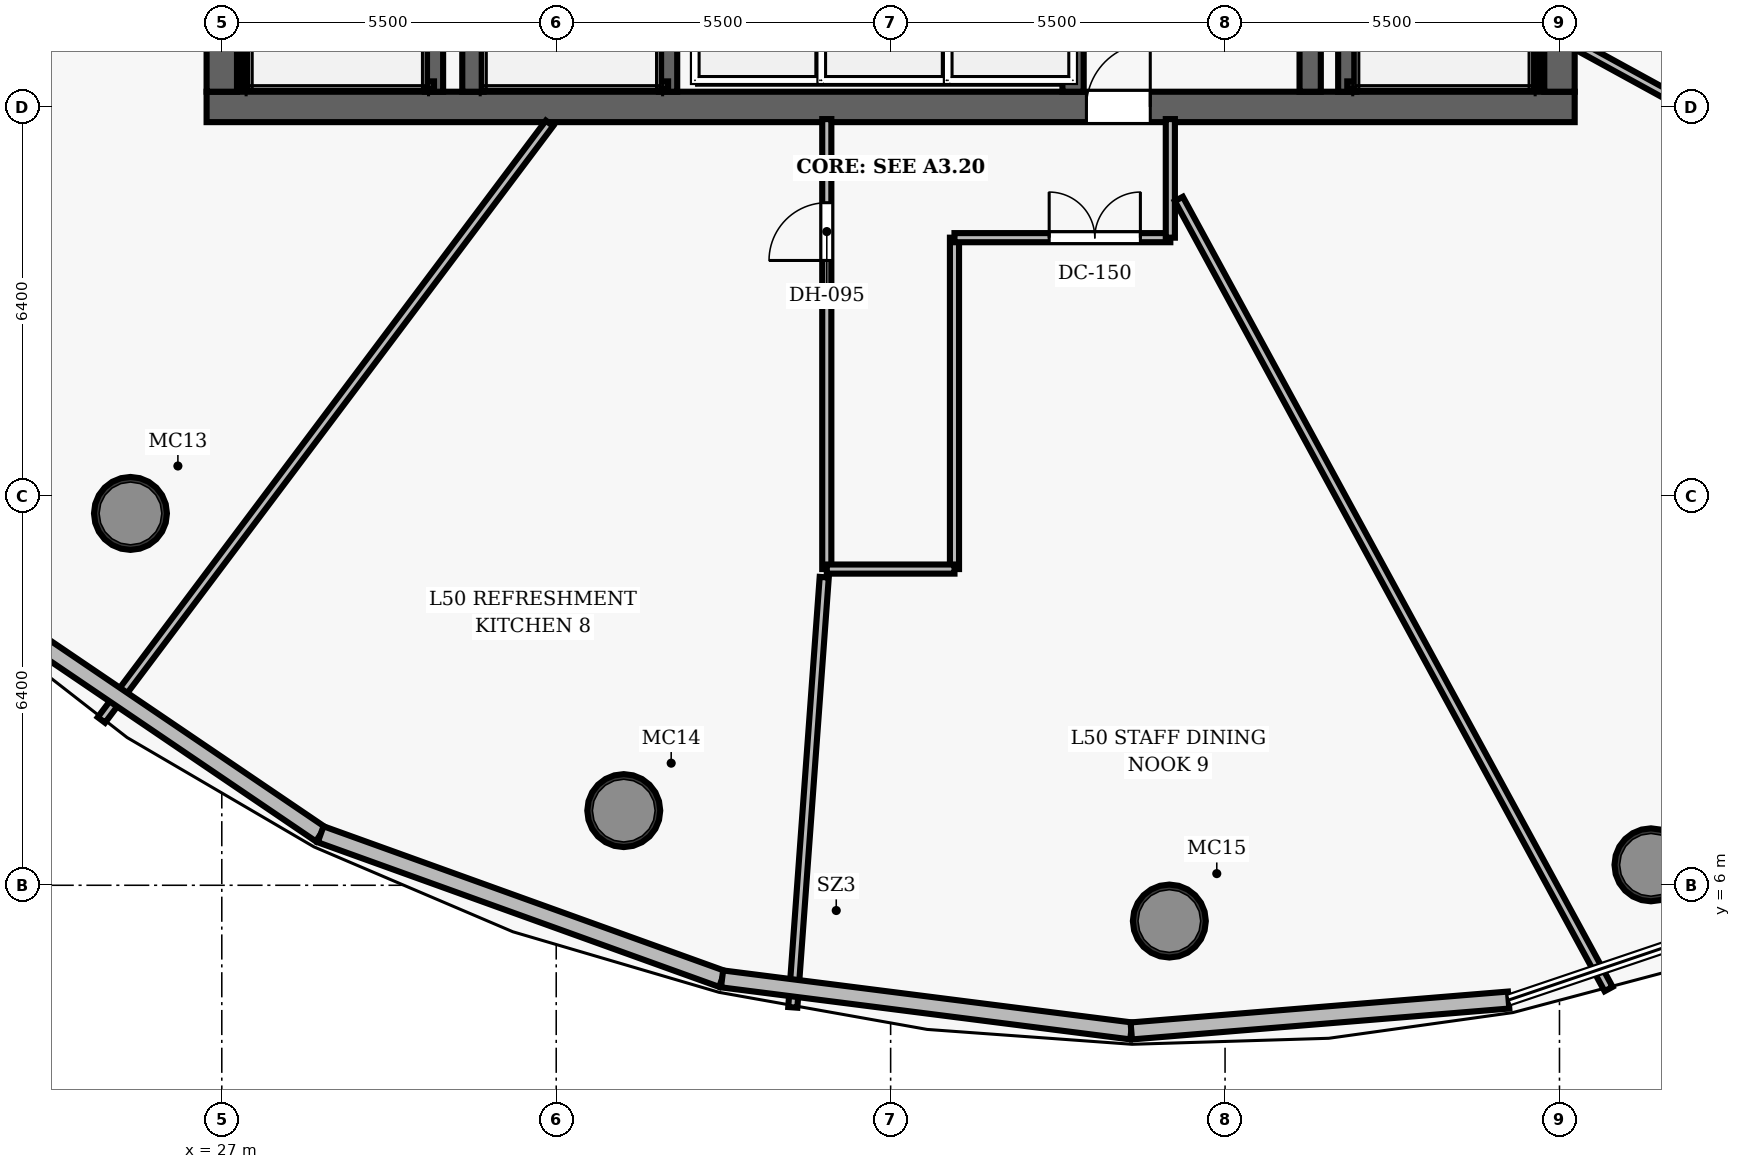
"""IFC4 building model, lengths in metres.
Left out: names, types, materials, properties, quantities, classifications, styles, units other than length and angle.
Written with IfcOpenShell. Run it as: python <this file> out.ifc"""

import sys

from ifc_helpers import new_model, si_unit, direction, frame, frame_2d, origin, origin_2d, place, context, subcontext, project, spatial, rectangle, hollow_circle, extrude, element, fill, save


model = new_model("IFC4")
c1 = context("Model", 3, precision=1e-05, world=origin(), true_north=direction((0.0, 1.0)))
c2 = subcontext(c1, "Body", "Model", "MODEL_VIEW")
j1 = project(units=[si_unit("LENGTHUNIT", "METRE"), si_unit("PLANEANGLEUNIT", "RADIAN")], contexts=[c1])
p1 = place(None, origin())
s1 = spatial("IfcSite", under=j1, at=p1, CompositionType="ELEMENT")
p2 = place(p1, origin())
s2 = spatial("IfcBuilding", under=s1, at=p2, CompositionType="ELEMENT")
p3 = place(p2, frame((0.0, 0.0, 198.15)))
s3 = spatial("IfcBuildingStorey", under=s2, at=p3, CompositionType="ELEMENT", Elevation=198.15)
p4 = place(p3, frame((26.75, 18.8, 0.0), z_axis=(0.0, 0.0, 1.0), x_axis=(1.0, 0.0, 0.0)))
e1 = element("IfcWall", 1, at=p4, inside=s3, PredefinedType="SHEAR", context=c2, shape_type="SweptSolid", body=[
    extrude(rectangle(XDim=22.5, YDim=0.5, at=frame_2d((11.25, 0.0))), origin(), (0.0, 0.0, 1.0), 3.85),
])
p5 = place(p4, frame((14.47, 0.0, 0.0)))
e2 = element("IfcOpeningElement", 2, at=p5, cuts=e1, PredefinedType="OPENING", context=c2, shape_type="SweptSolid", body=[
    extrude(rectangle(XDim=1.05, YDim=2.15, at=frame_2d((0.525, 1.075))), frame((0.0, 0.26, 0.0), z_axis=(0.0, -1.0, 0.0), x_axis=(1.0, 0.0, 0.0)), (0.0, 0.0, 1.0), 0.52),
])
p6 = place(p3, frame((27.0, 19.05, 0.0), z_axis=(0.0, 0.0, 1.0), x_axis=(0.0, 1.0, 0.0)))
e3 = element("IfcWall", 3, at=p6, inside=s3, PredefinedType="SHEAR", context=c2, shape_type="SweptSolid", body=[
    extrude(rectangle(XDim=13.9, YDim=0.5, at=frame_2d((6.95, 0.0))), origin(), (0.0, 0.0, 1.0), 3.85),
])
p7 = place(p6, frame((8.2, 0.0, 0.0)))
e4 = element("IfcOpeningElement", 4, at=p7, cuts=e3, PredefinedType="OPENING", context=c2, shape_type="SweptSolid", body=[
    extrude(rectangle(XDim=1.05, YDim=2.15, at=frame_2d((0.525, 1.075))), frame((0.0, 0.26, 0.0), z_axis=(0.0, -1.0, 0.0), x_axis=(1.0, 0.0, 0.0)), (0.0, 0.0, 1.0), 0.52),
])
p8 = place(p3, frame((49.0, 19.05, 0.0), z_axis=(0.0, 0.0, 1.0), x_axis=(0.0, 1.0, 0.0)))
e5 = element("IfcWall", 5, at=p8, inside=s3, PredefinedType="SHEAR", context=c2, shape_type="SweptSolid", body=[
    extrude(rectangle(XDim=13.9, YDim=0.5, at=frame_2d((6.95, 0.0))), origin(), (0.0, 0.0, 1.0), 3.85),
])
p9 = place(p8, frame((8.2, 0.0, 0.0)))
e6 = element("IfcOpeningElement", 6, at=p9, cuts=e5, PredefinedType="OPENING", context=c2, shape_type="SweptSolid", body=[
    extrude(rectangle(XDim=1.05, YDim=2.15, at=frame_2d((0.525, 1.075))), frame((0.0, 0.26, 0.0), z_axis=(0.0, -1.0, 0.0), x_axis=(1.0, 0.0, 0.0)), (0.0, 0.0, 1.0), 0.52),
])
for number, where, z_axis, x_axis in (
    (7, (31.13, 19.05, 0.0), (0.0, 0.0, 1.0), (0.0, 1.0, 0.0)),
    (8, (44.9, 19.05, 0.0), (0.0, 0.0, 1.0), (0.0, 1.0, 0.0)),
):
    element("IfcWall", number, at=place(p3, frame(where, z_axis=z_axis, x_axis=x_axis)), inside=s3, PredefinedType="SHEAR", context=c2, shape_type="SweptSolid", body=[
        extrude(rectangle(XDim=13.9, YDim=0.35, at=frame_2d((6.95, 0.0))), origin(), (0.0, 0.0, 1.0), 3.85),
    ])
for number, where, z_axis, x_axis in (
    (9, (25.498, 12.115, 0.0), (0.0, 0.0, 1.0), (1.0, 0.0, 0.0)),
    (10, (33.611, 7.228, 0.0), (0.0, 0.0, 1.0), (1.0, 0.0, 0.0)),
    (11, (42.584, 5.412, 0.0), (0.0, 0.0, 1.0), (1.0, 0.0, 0.0)),
    (12, (50.504, 6.336, 0.0), (0.0, 0.0, 1.0), (1.0, 0.0, 0.0)),
):
    element("IfcColumn", number, at=place(p3, frame(where, z_axis=z_axis, x_axis=x_axis)), inside=s3, PredefinedType="COLUMN", context=c2, shape_type="SweptSolid", body=[
        extrude(hollow_circle(Radius=0.6, WallThickness=0.05, at=origin_2d()), origin(), (0.0, 0.0, 1.0), 3.85),
    ])
p10 = place(p3, frame((30.49, 19.05, 0.0), z_axis=(0.0, 0.0, 1.0), x_axis=(0.0, 1.0, 0.0)))
e13 = element("IfcWall", 13, at=p10, inside=s3, PredefinedType="SHEAR", context=c2, shape_type="SweptSolid", body=[
    extrude(rectangle(XDim=7.5, YDim=0.3, at=frame_2d((3.75, 0.0))), origin(), (0.0, 0.0, 1.0), 3.85),
])
p11 = place(p3, frame((27.395, 19.1, 0.0), z_axis=(0.0, 0.0, 1.0), x_axis=(0.0, 1.0, 0.0)))
e14 = element("IfcWall", 14, at=p11, inside=s3, PredefinedType="SHEAR", context=c2, shape_type="SweptSolid", body=[
    extrude(rectangle(XDim=7.45, YDim=0.12, at=frame_2d((3.725, 0.0))), origin(), (0.0, 0.0, 1.0), 3.85),
])
p12 = place(p3, frame((27.395, 19.16, 0.0), z_axis=(0.0, 0.0, 1.0), x_axis=(1.0, 0.0, 0.0)))
e15 = element("IfcWall", 15, at=p12, inside=s3, PredefinedType="SHEAR", context=c2, shape_type="SweptSolid", body=[
    extrude(rectangle(XDim=3.095, YDim=0.12, at=frame_2d((1.547, 0.0))), origin(), (0.0, 0.0, 1.0), 3.85),
])
p13 = place(p3, frame((45.51, 19.05, 0.0), z_axis=(0.0, 0.0, 1.0), x_axis=(0.0, 1.0, 0.0)))
e16 = element("IfcWall", 16, at=p13, inside=s3, PredefinedType="SHEAR", context=c2, shape_type="SweptSolid", body=[
    extrude(rectangle(XDim=7.5, YDim=0.3, at=frame_2d((3.75, 0.0))), origin(), (0.0, 0.0, 1.0), 3.85),
])
p14 = place(p3, frame((48.605, 19.1, 0.0), z_axis=(0.0, 0.0, 1.0), x_axis=(0.0, 1.0, 0.0)))
e17 = element("IfcWall", 17, at=p14, inside=s3, PredefinedType="SHEAR", context=c2, shape_type="SweptSolid", body=[
    extrude(rectangle(XDim=7.45, YDim=0.12, at=frame_2d((3.725, 0.0))), origin(), (0.0, 0.0, 1.0), 3.85),
])
p15 = place(p3, frame((45.51, 19.16, 0.0), z_axis=(0.0, 0.0, 1.0), x_axis=(1.0, 0.0, 0.0)))
e18 = element("IfcWall", 18, at=p15, inside=s3, PredefinedType="SHEAR", context=c2, shape_type="SweptSolid", body=[
    extrude(rectangle(XDim=3.095, YDim=0.12, at=frame_2d((1.547, 0.0))), origin(), (0.0, 0.0, 1.0), 3.85),
])
p16 = place(p3, frame((34.34, 19.05, 0.0), z_axis=(0.0, 0.0, 1.0), x_axis=(0.0, 1.0, 0.0)))
e19 = element("IfcWall", 19, at=p16, inside=s3, PredefinedType="SHEAR", context=c2, shape_type="SweptSolid", body=[
    extrude(rectangle(XDim=7.5, YDim=0.3, at=frame_2d((3.75, 0.0))), origin(), (0.0, 0.0, 1.0), 3.85),
])
p17 = place(p3, frame((31.3, 19.16, 0.0), z_axis=(0.0, 0.0, 1.0), x_axis=(1.0, 0.0, 0.0)))
e20 = element("IfcWall", 20, at=p17, inside=s3, PredefinedType="SHEAR", context=c2, shape_type="SweptSolid", body=[
    extrude(rectangle(XDim=3.04, YDim=0.12, at=frame_2d((1.52, 0.0))), origin(), (0.0, 0.0, 1.0), 3.85),
])
p18 = place(p3, frame((41.0, 19.05, 0.0), z_axis=(0.0, 0.0, 1.0), x_axis=(0.0, 1.0, 0.0)))
e21 = element("IfcWall", 21, at=p18, inside=s3, PredefinedType="SHEAR", context=c2, shape_type="SweptSolid", body=[
    extrude(rectangle(XDim=2.08, YDim=0.35, at=frame_2d((1.04, 0.0))), origin(), (0.0, 0.0, 1.0), 3.035),
])
p19 = place(p3, frame((36.95, 11.2, 0.0), z_axis=(0.0, 0.0, 1.0), x_axis=(0.0, 1.0, 0.0)))
e22 = element("IfcWall", 22, at=p19, inside=s3, PredefinedType="PARTITIONING", context=c2, shape_type="SweptSolid", body=[
    extrude(rectangle(XDim=7.4, YDim=0.15, at=frame_2d((3.7, 0.0))), origin(), (0.0, 0.0, 1.0), 3.035),
])
p20 = place(p19, frame((5.075, 0.0, 0.0)))
e23 = element("IfcOpeningElement", 23, at=p20, cuts=e22, PredefinedType="OPENING", context=c2, shape_type="SweptSolid", body=[
    extrude(rectangle(XDim=0.95, YDim=2.15, at=frame_2d((0.475, 1.075))), frame((0.0, 0.085, 0.0), z_axis=(0.0, -1.0, 0.0), x_axis=(1.0, 0.0, 0.0)), (0.0, 0.0, 1.0), 0.17),
])
p21 = place(p3, frame((39.05, 11.2, 0.0), z_axis=(0.0, 0.0, 1.0), x_axis=(0.0, 1.0, 0.0)))
e24 = element("IfcWall", 24, at=p21, inside=s3, PredefinedType="PARTITIONING", context=c2, shape_type="SweptSolid", body=[
    extrude(rectangle(XDim=5.45, YDim=0.15, at=frame_2d((2.725, 0.0))), origin(), (0.0, 0.0, 1.0), 3.035),
])
p22 = place(p3, frame((39.05, 16.65, 0.0), z_axis=(0.0, 0.0, 1.0), x_axis=(1.0, 0.0, 0.0)))
e25 = element("IfcWall", 25, at=p22, inside=s3, PredefinedType="PARTITIONING", context=c2, shape_type="SweptSolid", body=[
    extrude(rectangle(XDim=3.55, YDim=0.15, at=frame_2d((1.775, 0.0))), origin(), (0.0, 0.0, 1.0), 3.035),
])
p23 = place(p22, frame((1.558, 0.0, 0.0)))
e26 = element("IfcOpeningElement", 26, at=p23, cuts=e25, PredefinedType="OPENING", context=c2, shape_type="SweptSolid", body=[
    extrude(rectangle(XDim=1.5, YDim=2.2, at=frame_2d((0.75, 1.1))), frame((0.0, 0.085, 0.0), z_axis=(0.0, -1.0, 0.0), x_axis=(1.0, 0.0, 0.0)), (0.0, 0.0, 1.0), 0.17),
])
p24 = place(p3, frame((42.6, 16.65, 0.0), z_axis=(0.0, 0.0, 1.0), x_axis=(0.0, 1.0, 0.0)))
e27 = element("IfcWall", 27, at=p24, inside=s3, PredefinedType="PARTITIONING", context=c2, shape_type="SweptSolid", body=[
    extrude(rectangle(XDim=1.95, YDim=0.15, at=frame_2d((0.975, 0.0))), origin(), (0.0, 0.0, 1.0), 3.035),
])
p25 = place(p3, frame((36.95, 11.2, 0.0), z_axis=(0.0, 0.0, 1.0), x_axis=(1.0, 0.0, 0.0)))
e28 = element("IfcWall", 28, at=p25, inside=s3, PredefinedType="PARTITIONING", context=c2, shape_type="SweptSolid", body=[
    extrude(rectangle(XDim=2.1, YDim=0.15, at=frame_2d((1.05, 0.0))), origin(), (0.0, 0.0, 1.0), 3.035),
])
p26 = place(p3, frame((26.73, 21.817, 0.0), z_axis=(0.0, 0.0, 1.0), x_axis=(-0.937501901357, -0.347980150227, 0.0)))
e29 = element("IfcWall", 29, at=p26, inside=s3, PredefinedType="PARTITIONING", context=c2, shape_type="SweptSolid", body=[
    extrude(rectangle(XDim=10.604, YDim=0.15, at=frame_2d((5.302, 0.0))), origin(), (0.0, 0.0, 1.0), 3.035),
])
p27 = place(p3, frame((32.389, 18.53, 0.0), z_axis=(0.0, 0.0, 1.0), x_axis=(-0.60053784947, -0.799596330253, 0.0)))
e30 = element("IfcWall", 30, at=p27, inside=s3, PredefinedType="PARTITIONING", context=c2, shape_type="SweptSolid", body=[
    extrude(rectangle(XDim=12.271, YDim=0.15, at=frame_2d((6.135, 0.0))), origin(), (0.0, 0.0, 1.0), 3.035),
])
p28 = place(p3, frame((36.908, 11.066, 0.0), z_axis=(0.0, 0.0, 1.0), x_axis=(-0.072932218328, -0.997336899713, 0.0)))
e31 = element("IfcWall", 31, at=p28, inside=s3, PredefinedType="PARTITIONING", context=c2, shape_type="SweptSolid", body=[
    extrude(rectangle(XDim=7.093, YDim=0.15, at=frame_2d((3.547, 0.0))), origin(), (0.0, 0.0, 1.0), 3.035),
])
p29 = place(p3, frame((42.74, 17.287, 0.0), z_axis=(0.0, 0.0, 1.0), x_axis=(0.477858429319, -0.878436862574, 0.0)))
e32 = element("IfcWall", 32, at=p29, inside=s3, PredefinedType="PARTITIONING", context=c2, shape_type="SweptSolid", body=[
    extrude(rectangle(XDim=14.791, YDim=0.15, at=frame_2d((7.396, 0.0))), origin(), (0.0, 0.0, 1.0), 3.035),
])
p30 = place(p3, frame((49.27, 19.823, 0.0), z_axis=(0.0, 0.0, 1.0), x_axis=(0.876912085574, -0.48065080274, 0.0)))
e33 = element("IfcWall", 33, at=p30, inside=s3, PredefinedType="PARTITIONING", context=c2, shape_type="SweptSolid", body=[
    extrude(rectangle(XDim=12.489, YDim=0.15, at=frame_2d((6.245, 0.0))), origin(), (0.0, 0.0, 1.0), 3.035),
])
p31 = place(p3, frame((28.625, 6.839, 0.0), z_axis=(0.0, 0.0, 1.0), x_axis=(-0.827523497292, 0.561431083419, 0.0)))
e34 = element("IfcWall", 34, at=p31, inside=s3, PredefinedType="SOLIDWALL", context=c2, shape_type="SweptSolid", body=[
    extrude(rectangle(XDim=7.045, YDim=0.28, at=frame_2d((3.523, 0.0))), origin(), (0.0, 0.0, 1.0), 3.62),
])
p32 = place(p3, frame((35.228, 4.46, 0.0), z_axis=(0.0, 0.0, 1.0), x_axis=(-0.94083018899, 0.338878378603, 0.0)))
e35 = element("IfcWall", 35, at=p32, inside=s3, PredefinedType="SOLIDWALL", context=c2, shape_type="SweptSolid", body=[
    extrude(rectangle(XDim=7.018, YDim=0.28, at=frame_2d((3.509, 0.0))), origin(), (0.0, 0.0, 1.0), 3.62),
])
p33 = place(p3, frame((41.958, 3.604, 0.0), z_axis=(0.0, 0.0, 1.0), x_axis=(-0.992009297988, 0.126164783935, 0.0)))
e36 = element("IfcWall", 36, at=p33, inside=s3, PredefinedType="SOLIDWALL", context=c2, shape_type="SweptSolid", body=[
    extrude(rectangle(XDim=6.784, YDim=0.28, at=frame_2d((3.392, 0.0))), origin(), (0.0, 0.0, 1.0), 3.62),
])
p34 = place(p3, frame((48.163, 4.112, 0.0), z_axis=(0.0, 0.0, 1.0), x_axis=(-0.996668503052, -0.081559150458, 0.0)))
e37 = element("IfcWall", 37, at=p34, inside=s3, PredefinedType="SOLIDWALL", context=c2, shape_type="SweptSolid", body=[
    extrude(rectangle(XDim=6.226, YDim=0.28, at=frame_2d((3.113, 0.0))), origin(), (0.0, 0.0, 1.0), 3.62),
])
p35 = place(p5, origin())
e38 = element("IfcDoor", 38, at=p35, inside=s3, OperationType="SINGLE_SWING_RIGHT", PredefinedType="DOOR", context=c2, shape_type="SweptSolid", body=[
    extrude(rectangle(XDim=1.05, YDim=2.15, at=frame_2d((0.525, 1.075))), frame((0.0, 0.025, 0.0), z_axis=(0.0, -1.0, 0.0), x_axis=(1.0, 0.0, 0.0)), (0.0, 0.0, 1.0), 0.05),
])
fill(e2, e38)
p36 = place(p20, origin())
e39 = element("IfcDoor", 39, at=p36, inside=s3, OperationType="SINGLE_SWING_LEFT", PredefinedType="DOOR", context=c2, shape_type="SweptSolid", body=[
    extrude(rectangle(XDim=0.95, YDim=2.15, at=frame_2d((0.475, 1.075))), frame((0.0, 0.025, 0.0), z_axis=(0.0, -1.0, 0.0), x_axis=(1.0, 0.0, 0.0)), (0.0, 0.0, 1.0), 0.05),
])
fill(e23, e39)
p37 = place(p23, origin())
e40 = element("IfcDoor", 40, at=p37, inside=s3, OperationType="DOUBLE_DOOR_SINGLE_SWING", PredefinedType="DOOR", context=c2, shape_type="SweptSolid", body=[
    extrude(rectangle(XDim=1.5, YDim=2.2, at=frame_2d((0.75, 1.1))), frame((0.0, 0.025, 0.0), z_axis=(0.0, -1.0, 0.0), x_axis=(1.0, 0.0, 0.0)), (0.0, 0.0, 1.0), 0.05),
])
fill(e26, e40)
save(model, sys.argv[1])
